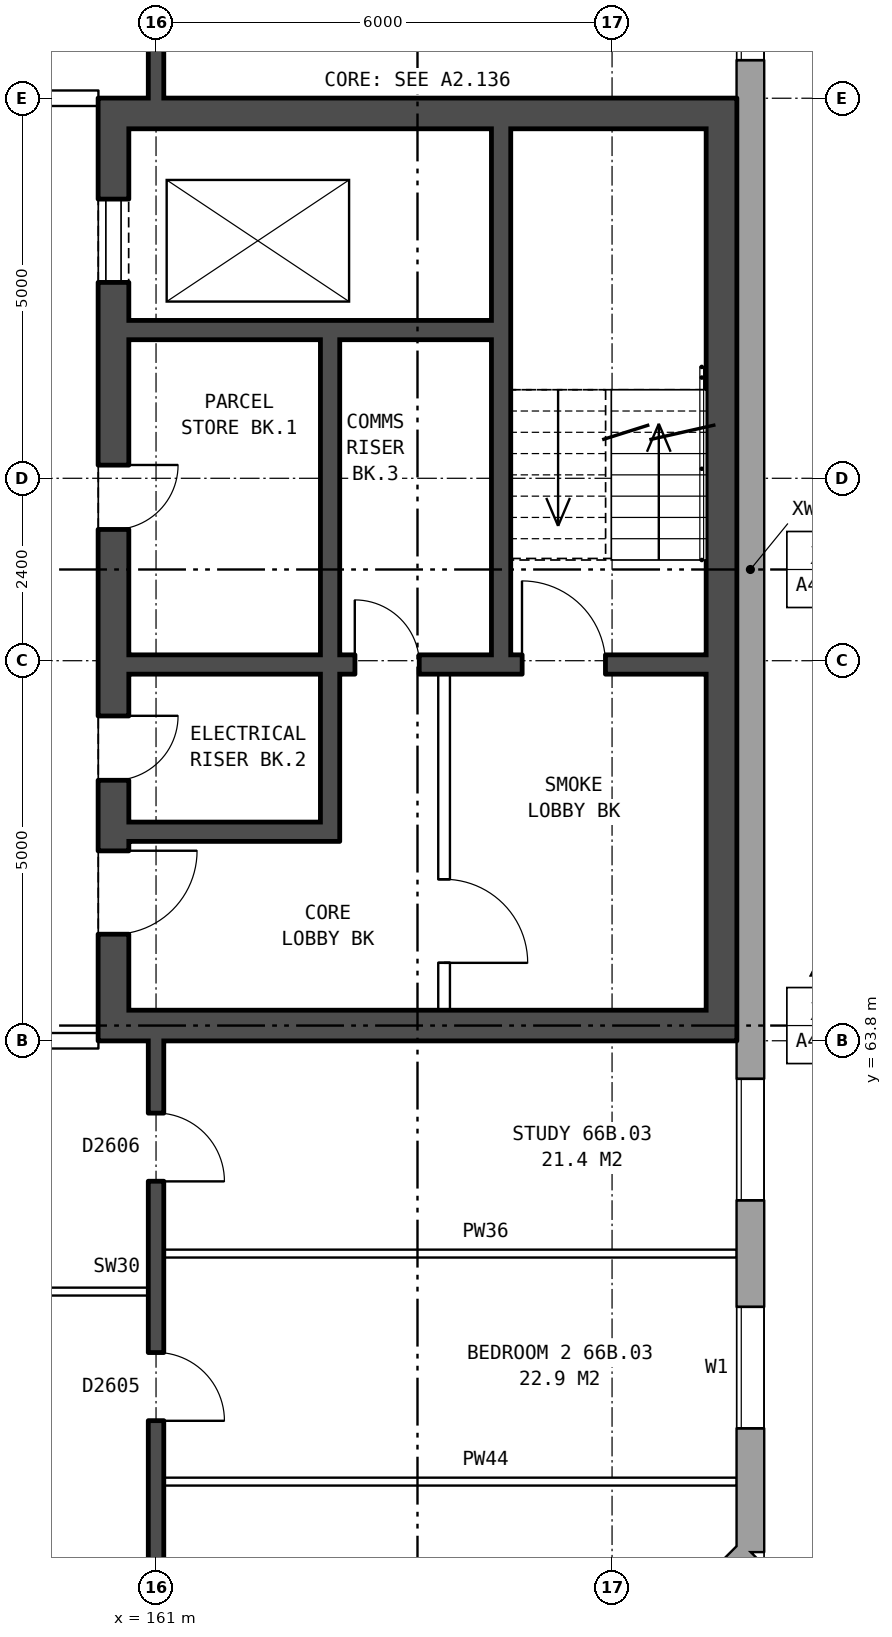
"""IFC4 building model, lengths in metres.
Left out: names, types, materials, properties, quantities, classifications, styles, units other than length and angle.
Written with IfcOpenShell. Run it as: python <this file> out.ifc"""

import sys

from ifc_helpers import new_model, si_unit, direction, frame, frame_2d, origin, place, context, subcontext, project, spatial, rectangle, extrude, element, fill, save


model = new_model("IFC4")
c1 = context("Model", 3, precision=1e-05, world=origin(), true_north=direction((0.0, 1.0)))
c2 = subcontext(c1, "Body", "Model", "MODEL_VIEW")
j1 = project(units=[si_unit("LENGTHUNIT", "METRE"), si_unit("PLANEANGLEUNIT", "RADIAN")], contexts=[c1])
p1 = place(None, origin())
s1 = spatial("IfcSite", under=j1, at=p1, CompositionType="ELEMENT")
p2 = place(p1, origin())
s2 = spatial("IfcBuilding", under=s1, at=p2, CompositionType="ELEMENT")
p3 = place(p2, frame((0.0, 0.0, 233.8)))
s3 = spatial("IfcBuildingStorey", under=s2, at=p3, CompositionType="ELEMENT", Elevation=233.8)
p4 = place(p3, frame((165.925, 54.18, 0.0), z_axis=(0.0, 0.0, 1.0), x_axis=(0.707106781187, 0.707106781187, 0.0)))
e1 = element("IfcWall", 1, at=p4, inside=s3, PredefinedType="STANDARD", context=c2, shape_type="SweptSolid", body=[
    extrude(rectangle(XDim=4.094, YDim=0.36, at=frame_2d((2.047, 0.0))), origin(), (0.0, 0.0, 1.0), 2.85),
])
p5 = place(p4, frame((1.247, 0.0, 0.8)))
e2 = element("IfcOpeningElement", 2, at=p5, cuts=e1, PredefinedType="OPENING", context=c2, shape_type="SweptSolid", body=[
    extrude(rectangle(XDim=1.6, YDim=1.8, at=frame_2d((0.8, 0.9))), frame((0.0, 0.19, 0.0), z_axis=(0.0, -1.0, 0.0), x_axis=(1.0, 0.0, 0.0)), (0.0, 0.0, 1.0), 0.38),
])
p6 = place(p3, frame((168.82, 57.075, 0.0), z_axis=(0.0, 0.0, 1.0), x_axis=(0.0, 1.0, 0.0)))
e3 = element("IfcWall", 3, at=p6, inside=s3, PredefinedType="STANDARD", context=c2, shape_type="SweptSolid", body=[
    extrude(rectangle(XDim=25.851, YDim=0.36, at=frame_2d((12.925, 0.0))), origin(), (0.0, 0.0, 1.0), 2.85),
])
p7 = place(p6, frame((1.625, 0.0, 0.8)))
e4 = element("IfcOpeningElement", 4, at=p7, cuts=e3, PredefinedType="OPENING", context=c2, shape_type="SweptSolid", body=[
    extrude(rectangle(XDim=1.6, YDim=1.8, at=frame_2d((0.8, 0.9))), frame((0.0, 0.19, 0.0), z_axis=(0.0, -1.0, 0.0), x_axis=(1.0, 0.0, 0.0)), (0.0, 0.0, 1.0), 0.38),
])
p8 = place(p6, frame((4.625, 0.0, 0.8)))
e5 = element("IfcOpeningElement", 5, at=p8, cuts=e3, PredefinedType="OPENING", context=c2, shape_type="SweptSolid", body=[
    extrude(rectangle(XDim=1.6, YDim=1.8, at=frame_2d((0.8, 0.9))), frame((0.0, 0.19, 0.0), z_axis=(0.0, -1.0, 0.0), x_axis=(1.0, 0.0, 0.0)), (0.0, 0.0, 1.0), 0.38),
])
p9 = place(p6, frame((19.625, 0.0, 0.8)))
e6 = element("IfcOpeningElement", 6, at=p9, cuts=e3, PredefinedType="OPENING", context=c2, shape_type="SweptSolid", body=[
    extrude(rectangle(XDim=1.6, YDim=1.8, at=frame_2d((0.8, 0.9))), frame((0.0, 0.19, 0.0), z_axis=(0.0, -1.0, 0.0), x_axis=(1.0, 0.0, 0.0)), (0.0, 0.0, 1.0), 0.38),
])
p10 = place(p6, frame((22.625, 0.0, 0.8)))
e7 = element("IfcOpeningElement", 7, at=p10, cuts=e3, PredefinedType="OPENING", context=c2, shape_type="SweptSolid", body=[
    extrude(rectangle(XDim=1.6, YDim=1.8, at=frame_2d((0.8, 0.9))), frame((0.0, 0.19, 0.0), z_axis=(0.0, -1.0, 0.0), x_axis=(1.0, 0.0, 0.0)), (0.0, 0.0, 1.0), 0.38),
])
p11 = place(p3, frame((160.44, 76.2, 0.0), z_axis=(0.0, 0.0, 1.0), x_axis=(0.0, -1.0, 0.0)))
e8 = element("IfcWall", 8, at=p11, inside=s3, PredefinedType="SHEAR", context=c2, shape_type="SweptSolid", body=[
    extrude(rectangle(XDim=12.4, YDim=0.4, at=frame_2d((6.2, 0.0))), origin(), (0.0, 0.0, 1.0), 2.85),
])
p12 = place(p11, frame((1.325, 0.0, 0.0)))
e9 = element("IfcOpeningElement", 9, at=p12, cuts=e8, PredefinedType="OPENING", context=c2, shape_type="SweptSolid", body=[
    extrude(rectangle(XDim=1.1, YDim=2.1, at=frame_2d((0.55, 1.05))), frame((0.0, 0.21, 0.0), z_axis=(0.0, -1.0, 0.0), x_axis=(1.0, 0.0, 0.0)), (0.0, 0.0, 1.0), 0.42),
])
p13 = place(p11, frame((4.825, 0.0, 0.0)))
e10 = element("IfcOpeningElement", 10, at=p13, cuts=e8, PredefinedType="OPENING", context=c2, shape_type="SweptSolid", body=[
    extrude(rectangle(XDim=0.85, YDim=2.1, at=frame_2d((0.425, 1.05))), frame((0.0, 0.21, 0.0), z_axis=(0.0, -1.0, 0.0), x_axis=(1.0, 0.0, 0.0)), (0.0, 0.0, 1.0), 0.42),
])
p14 = place(p11, frame((9.9, 0.0, 0.0)))
e11 = element("IfcOpeningElement", 11, at=p14, cuts=e8, PredefinedType="OPENING", context=c2, shape_type="SweptSolid", body=[
    extrude(rectangle(XDim=1.1, YDim=2.1, at=frame_2d((0.55, 1.05))), frame((0.0, 0.21, 0.0), z_axis=(0.0, -1.0, 0.0), x_axis=(1.0, 0.0, 0.0)), (0.0, 0.0, 1.0), 0.42),
])
p15 = place(p11, frame((8.125, 0.0, 0.0)))
e12 = element("IfcOpeningElement", 12, at=p15, cuts=e8, PredefinedType="OPENING", context=c2, shape_type="SweptSolid", body=[
    extrude(rectangle(XDim=0.85, YDim=2.1, at=frame_2d((0.425, 1.05))), frame((0.0, 0.21, 0.0), z_axis=(0.0, -1.0, 0.0), x_axis=(1.0, 0.0, 0.0)), (0.0, 0.0, 1.0), 0.42),
])
p16 = place(p3, frame((168.44, 76.2, 0.0), z_axis=(0.0, 0.0, 1.0), x_axis=(0.0, -1.0, 0.0)))
e13 = element("IfcWall", 13, at=p16, inside=s3, PredefinedType="SHEAR", context=c2, shape_type="SweptSolid", body=[
    extrude(rectangle(XDim=12.4, YDim=0.4, at=frame_2d((6.2, 0.0))), origin(), (0.0, 0.0, 1.0), 2.85),
])
for number, where, z_axis, x_axis in (
    (14, (160.64, 76.0, 0.0), (0.0, 0.0, 1.0), (1.0, 0.0, 0.0)),
    (15, (160.64, 64.0, 0.0), (0.0, 0.0, 1.0), (1.0, 0.0, 0.0)),
):
    element("IfcWall", number, at=place(p3, frame(where, z_axis=z_axis, x_axis=x_axis)), inside=s3, PredefinedType="SHEAR", context=c2, shape_type="SweptSolid", body=[
        extrude(rectangle(XDim=7.6, YDim=0.4, at=frame_2d((3.8, 0.0))), origin(), (0.0, 0.0, 1.0), 2.85),
    ])
p17 = place(p3, frame((160.64, 73.15, 0.0), z_axis=(0.0, 0.0, 1.0), x_axis=(1.0, 0.0, 0.0)))
e16 = element("IfcWall", 16, at=p17, inside=s3, PredefinedType="SHEAR", context=c2, shape_type="SweptSolid", body=[
    extrude(rectangle(XDim=4.775, YDim=0.25, at=frame_2d((2.388, 0.0))), origin(), (0.0, 0.0, 1.0), 2.85),
])
p18 = place(p3, frame((160.64, 68.75, 0.0), z_axis=(0.0, 0.0, 1.0), x_axis=(1.0, 0.0, 0.0)))
e17 = element("IfcWall", 17, at=p18, inside=s3, PredefinedType="SHEAR", context=c2, shape_type="SweptSolid", body=[
    extrude(rectangle(XDim=7.6, YDim=0.25, at=frame_2d((3.8, 0.0))), origin(), (0.0, 0.0, 1.0), 2.85),
])
p19 = place(p18, frame((5.175, 0.0, 0.0)))
e18 = element("IfcOpeningElement", 18, at=p19, cuts=e17, PredefinedType="OPENING", context=c2, shape_type="SweptSolid", body=[
    extrude(rectangle(XDim=1.1, YDim=2.1, at=frame_2d((0.55, 1.05))), frame((0.0, 0.135, 0.0), z_axis=(0.0, -1.0, 0.0), x_axis=(1.0, 0.0, 0.0)), (0.0, 0.0, 1.0), 0.27),
])
p20 = place(p18, frame((2.975, 0.0, 0.0)))
e19 = element("IfcOpeningElement", 19, at=p20, cuts=e17, PredefinedType="OPENING", context=c2, shape_type="SweptSolid", body=[
    extrude(rectangle(XDim=0.85, YDim=2.1, at=frame_2d((0.425, 1.05))), frame((0.0, 0.135, 0.0), z_axis=(0.0, -1.0, 0.0), x_axis=(1.0, 0.0, 0.0)), (0.0, 0.0, 1.0), 0.27),
])
p21 = place(p3, frame((160.64, 66.55, 0.0), z_axis=(0.0, 0.0, 1.0), x_axis=(1.0, 0.0, 0.0)))
e20 = element("IfcWall", 20, at=p21, inside=s3, PredefinedType="SHEAR", context=c2, shape_type="SweptSolid", body=[
    extrude(rectangle(XDim=2.525, YDim=0.25, at=frame_2d((1.263, 0.0))), origin(), (0.0, 0.0, 1.0), 2.85),
])
p22 = place(p3, frame((163.29, 73.025, 0.0), z_axis=(0.0, 0.0, 1.0), x_axis=(0.0, -1.0, 0.0)))
e21 = element("IfcWall", 21, at=p22, inside=s3, PredefinedType="SHEAR", context=c2, shape_type="SweptSolid", body=[
    extrude(rectangle(XDim=4.15, YDim=0.25, at=frame_2d((2.075, 0.0))), origin(), (0.0, 0.0, 1.0), 2.85),
])
p23 = place(p3, frame((163.29, 68.625, 0.0), z_axis=(0.0, 0.0, 1.0), x_axis=(0.0, -1.0, 0.0)))
e22 = element("IfcWall", 22, at=p23, inside=s3, PredefinedType="SHEAR", context=c2, shape_type="SweptSolid", body=[
    extrude(rectangle(XDim=2.2, YDim=0.25, at=frame_2d((1.1, 0.0))), origin(), (0.0, 0.0, 1.0), 2.85),
])
p24 = place(p3, frame((164.79, 68.625, 0.0), z_axis=(0.0, 0.0, 1.0), x_axis=(0.0, -1.0, 0.0)))
e23 = element("IfcWall", 23, at=p24, inside=s3, PredefinedType="PARTITIONING", context=c2, shape_type="SweptSolid", body=[
    extrude(rectangle(XDim=4.425, YDim=0.15, at=frame_2d((2.212, 0.0))), origin(), (0.0, 0.0, 1.0), 2.85),
])
p25 = place(p24, frame((2.7, 0.0, 0.0)))
e24 = element("IfcOpeningElement", 24, at=p25, cuts=e23, PredefinedType="OPENING", context=c2, shape_type="SweptSolid", body=[
    extrude(rectangle(XDim=1.1, YDim=2.1, at=frame_2d((0.55, 1.05))), frame((0.0, 0.085, 0.0), z_axis=(0.0, -1.0, 0.0), x_axis=(1.0, 0.0, 0.0)), (0.0, 0.0, 1.0), 0.17),
])
p26 = place(p3, frame((165.54, 75.8, 0.0), z_axis=(0.0, 0.0, 1.0), x_axis=(0.0, -1.0, 0.0)))
e25 = element("IfcWall", 25, at=p26, inside=s3, PredefinedType="SHEAR", context=c2, shape_type="SweptSolid", body=[
    extrude(rectangle(XDim=6.925, YDim=0.25, at=frame_2d((3.462, 0.0))), origin(), (0.0, 0.0, 1.0), 2.85),
])
p27 = place(p3, frame((161.1, 58.0, 0.0), z_axis=(0.0, 0.0, 1.0), x_axis=(1.0, 0.0, 0.0)))
e26 = element("IfcWall", 26, at=p27, inside=s3, PredefinedType="PARTITIONING", context=c2, shape_type="SweptSolid", body=[
    extrude(rectangle(XDim=7.54, YDim=0.1, at=frame_2d((3.77, 0.0))), origin(), (0.0, 0.0, 1.0), 2.85),
])
p28 = place(p3, frame((155.1, 60.5, 0.0), z_axis=(0.0, 0.0, 1.0), x_axis=(1.0, 0.0, 0.0)))
e27 = element("IfcWall", 27, at=p28, inside=s3, PredefinedType="PARTITIONING", context=c2, shape_type="SweptSolid", body=[
    extrude(rectangle(XDim=5.8, YDim=0.1, at=frame_2d((2.9, 0.0))), origin(), (0.0, 0.0, 1.0), 2.85),
])
p29 = place(p28, frame((3.6, 0.0, 0.0)))
e28 = element("IfcOpeningElement", 28, at=p29, cuts=e27, PredefinedType="OPENING", context=c2, shape_type="SweptSolid", body=[
    extrude(rectangle(XDim=0.9, YDim=2.1, at=frame_2d((0.45, 1.05))), frame((0.0, 0.06, 0.0), z_axis=(0.0, -1.0, 0.0), x_axis=(1.0, 0.0, 0.0)), (0.0, 0.0, 1.0), 0.12),
])
p30 = place(p28, frame((0.7, 0.0, 0.0)))
e29 = element("IfcOpeningElement", 29, at=p30, cuts=e27, PredefinedType="OPENING", context=c2, shape_type="SweptSolid", body=[
    extrude(rectangle(XDim=0.9, YDim=2.1, at=frame_2d((0.45, 1.05))), frame((0.0, 0.06, 0.0), z_axis=(0.0, -1.0, 0.0), x_axis=(1.0, 0.0, 0.0)), (0.0, 0.0, 1.0), 0.12),
])
p31 = place(p3, frame((161.1, 61.0, 0.0), z_axis=(0.0, 0.0, 1.0), x_axis=(1.0, 0.0, 0.0)))
e30 = element("IfcWall", 30, at=p31, inside=s3, PredefinedType="PARTITIONING", context=c2, shape_type="SweptSolid", body=[
    extrude(rectangle(XDim=7.54, YDim=0.1, at=frame_2d((3.77, 0.0))), origin(), (0.0, 0.0, 1.0), 2.85),
])
p32 = place(p3, frame((157.24, 63.8, 0.0), z_axis=(0.0, 0.0, 1.0), x_axis=(1.0, 0.0, 0.0)))
e31 = element("IfcWall", 31, at=p32, inside=s3, PredefinedType="PARTITIONING", context=c2, shape_type="SweptSolid", body=[
    extrude(rectangle(XDim=3.0, YDim=0.2, at=frame_2d((1.5, 0.0))), origin(), (0.0, 0.0, 1.0), 2.85),
])
p33 = place(p32, frame((1.0, 0.0, 0.0)))
e32 = element("IfcOpeningElement", 32, at=p33, cuts=e31, PredefinedType="OPENING", context=c2, shape_type="SweptSolid", body=[
    extrude(rectangle(XDim=1.0, YDim=2.1, at=frame_2d((0.5, 1.05))), frame((0.0, 0.11, 0.0), z_axis=(0.0, -1.0, 0.0), x_axis=(1.0, 0.0, 0.0)), (0.0, 0.0, 1.0), 0.22),
])
p34 = place(p3, frame((157.24, 76.2, 0.0), z_axis=(0.0, 0.0, 1.0), x_axis=(1.0, 0.0, 0.0)))
e33 = element("IfcWall", 33, at=p34, inside=s3, PredefinedType="PARTITIONING", context=c2, shape_type="SweptSolid", body=[
    extrude(rectangle(XDim=3.0, YDim=0.2, at=frame_2d((1.5, 0.0))), origin(), (0.0, 0.0, 1.0), 2.85),
])
p35 = place(p34, frame((1.0, 0.0, 0.0)))
e34 = element("IfcOpeningElement", 34, at=p35, cuts=e33, PredefinedType="OPENING", context=c2, shape_type="SweptSolid", body=[
    extrude(rectangle(XDim=1.0, YDim=2.1, at=frame_2d((0.5, 1.05))), frame((0.0, 0.11, 0.0), z_axis=(0.0, -1.0, 0.0), x_axis=(1.0, 0.0, 0.0)), (0.0, 0.0, 1.0), 0.22),
])
p36 = place(p3, frame((161.0, 54.36, 0.0), z_axis=(0.0, 0.0, 1.0), x_axis=(0.0, 1.0, 0.0)))
e35 = element("IfcWall", 35, at=p36, inside=s3, PredefinedType="SOLIDWALL", context=c2, shape_type="SweptSolid", body=[
    extrude(rectangle(XDim=9.44, YDim=0.2, at=frame_2d((4.72, 0.0))), origin(), (0.0, 0.0, 1.0), 2.85),
])
p37 = place(p36, frame((1.37, 0.0, 0.0)))
e36 = element("IfcOpeningElement", 36, at=p37, cuts=e35, PredefinedType="OPENING", context=c2, shape_type="SweptSolid", body=[
    extrude(rectangle(XDim=0.9, YDim=2.1, at=frame_2d((0.45, 1.05))), frame((0.0, 0.11, 0.0), z_axis=(0.0, -1.0, 0.0), x_axis=(1.0, 0.0, 0.0)), (0.0, 0.0, 1.0), 0.22),
])
p38 = place(p36, frame((4.44, 0.0, 0.0)))
e37 = element("IfcOpeningElement", 37, at=p38, cuts=e35, PredefinedType="OPENING", context=c2, shape_type="SweptSolid", body=[
    extrude(rectangle(XDim=0.9, YDim=2.1, at=frame_2d((0.45, 1.05))), frame((0.0, 0.11, 0.0), z_axis=(0.0, -1.0, 0.0), x_axis=(1.0, 0.0, 0.0)), (0.0, 0.0, 1.0), 0.22),
])
p39 = place(p36, frame((7.59, 0.0, 0.0)))
e38 = element("IfcOpeningElement", 38, at=p39, cuts=e35, PredefinedType="OPENING", context=c2, shape_type="SweptSolid", body=[
    extrude(rectangle(XDim=0.9, YDim=2.1, at=frame_2d((0.45, 1.05))), frame((0.0, 0.11, 0.0), z_axis=(0.0, -1.0, 0.0), x_axis=(1.0, 0.0, 0.0)), (0.0, 0.0, 1.0), 0.22),
])
p40 = place(p3, frame((161.0, 76.2, 0.0), z_axis=(0.0, 0.0, 1.0), x_axis=(0.0, 1.0, 0.0)))
e39 = element("IfcWall", 39, at=p40, inside=s3, PredefinedType="SOLIDWALL", context=c2, shape_type="SweptSolid", body=[
    extrude(rectangle(XDim=9.44, YDim=0.2, at=frame_2d((4.72, 0.0))), origin(), (0.0, 0.0, 1.0), 2.85),
])
p41 = place(p40, frame((1.2, 0.0, 0.0)))
e40 = element("IfcOpeningElement", 40, at=p41, cuts=e39, PredefinedType="OPENING", context=c2, shape_type="SweptSolid", body=[
    extrude(rectangle(XDim=0.9, YDim=2.1, at=frame_2d((0.45, 1.05))), frame((0.0, 0.11, 0.0), z_axis=(0.0, -1.0, 0.0), x_axis=(1.0, 0.0, 0.0)), (0.0, 0.0, 1.0), 0.22),
])
p42 = place(p7, origin())
e41 = element("IfcWindow", 41, at=p42, inside=s3, PartitioningType="SINGLE_PANEL", PredefinedType="WINDOW", context=c2, shape_type="SweptSolid", body=[
    extrude(rectangle(XDim=1.6, YDim=1.8, at=frame_2d((0.8, 0.9))), frame((0.0, 0.15, 0.0), z_axis=(0.0, -1.0, 0.0), x_axis=(1.0, 0.0, 0.0)), (0.0, 0.0, 1.0), 0.06),
])
fill(e4, e41)
p43 = place(p8, origin())
e42 = element("IfcWindow", 42, at=p43, inside=s3, PartitioningType="SINGLE_PANEL", PredefinedType="WINDOW", context=c2, shape_type="SweptSolid", body=[
    extrude(rectangle(XDim=1.6, YDim=1.8, at=frame_2d((0.8, 0.9))), frame((0.0, 0.15, 0.0), z_axis=(0.0, -1.0, 0.0), x_axis=(1.0, 0.0, 0.0)), (0.0, 0.0, 1.0), 0.06),
])
fill(e5, e42)
p44 = place(p9, origin())
e43 = element("IfcWindow", 43, at=p44, inside=s3, PartitioningType="SINGLE_PANEL", PredefinedType="WINDOW", context=c2, shape_type="SweptSolid", body=[
    extrude(rectangle(XDim=1.6, YDim=1.8, at=frame_2d((0.8, 0.9))), frame((0.0, 0.15, 0.0), z_axis=(0.0, -1.0, 0.0), x_axis=(1.0, 0.0, 0.0)), (0.0, 0.0, 1.0), 0.06),
])
fill(e6, e43)
p45 = place(p12, origin())
e44 = element("IfcDoor", 44, at=p45, inside=s3, OperationType="DOUBLE_DOOR_SLIDING", PredefinedType="DOOR", context=c2, shape_type="SweptSolid", body=[
    extrude(rectangle(XDim=1.1, YDim=2.1, at=frame_2d((0.55, 1.05))), frame((0.0, 0.185, 0.0), z_axis=(0.0, -1.0, 0.0), x_axis=(1.0, 0.0, 0.0)), (0.0, 0.0, 1.0), 0.05),
])
fill(e9, e44)
p46 = place(p13, origin())
e45 = element("IfcDoor", 45, at=p46, inside=s3, OperationType="SINGLE_SWING_LEFT", PredefinedType="DOOR", context=c2, shape_type="SweptSolid", body=[
    extrude(rectangle(XDim=0.85, YDim=2.1, at=frame_2d((0.425, 1.05))), frame((0.0, 0.185, 0.0), z_axis=(0.0, -1.0, 0.0), x_axis=(1.0, 0.0, 0.0)), (0.0, 0.0, 1.0), 0.05),
])
fill(e10, e45)
p47 = place(p14, origin())
e46 = element("IfcDoor", 46, at=p47, inside=s3, OperationType="SINGLE_SWING_LEFT", PredefinedType="DOOR", context=c2, shape_type="SweptSolid", body=[
    extrude(rectangle(XDim=1.1, YDim=2.1, at=frame_2d((0.55, 1.05))), frame((0.0, 0.185, 0.0), z_axis=(0.0, -1.0, 0.0), x_axis=(1.0, 0.0, 0.0)), (0.0, 0.0, 1.0), 0.05),
])
fill(e11, e46)
p48 = place(p25, origin())
e47 = element("IfcDoor", 47, at=p48, inside=s3, OperationType="SINGLE_SWING_RIGHT", PredefinedType="DOOR", context=c2, shape_type="SweptSolid", body=[
    extrude(rectangle(XDim=1.1, YDim=2.1, at=frame_2d((0.55, 1.05))), frame((0.0, 0.025, 0.0), z_axis=(0.0, -1.0, 0.0), x_axis=(1.0, 0.0, 0.0)), (0.0, 0.0, 1.0), 0.05),
])
fill(e24, e47)
p49 = place(p19, origin())
e48 = element("IfcDoor", 48, at=p49, inside=s3, OperationType="SINGLE_SWING_LEFT", PredefinedType="DOOR", context=c2, shape_type="SweptSolid", body=[
    extrude(rectangle(XDim=1.1, YDim=2.1, at=frame_2d((0.55, 1.05))), frame((0.0, 0.025, 0.0), z_axis=(0.0, -1.0, 0.0), x_axis=(1.0, 0.0, 0.0)), (0.0, 0.0, 1.0), 0.05),
])
fill(e18, e48)
p50 = place(p15, origin())
e49 = element("IfcDoor", 49, at=p50, inside=s3, OperationType="SINGLE_SWING_LEFT", PredefinedType="DOOR", context=c2, shape_type="SweptSolid", body=[
    extrude(rectangle(XDim=0.85, YDim=2.1, at=frame_2d((0.425, 1.05))), frame((0.0, 0.185, 0.0), z_axis=(0.0, -1.0, 0.0), x_axis=(1.0, 0.0, 0.0)), (0.0, 0.0, 1.0), 0.05),
])
fill(e12, e49)
p51 = place(p20, origin())
e50 = element("IfcDoor", 50, at=p51, inside=s3, OperationType="SINGLE_SWING_LEFT", PredefinedType="DOOR", context=c2, shape_type="SweptSolid", body=[
    extrude(rectangle(XDim=0.85, YDim=2.1, at=frame_2d((0.425, 1.05))), frame((0.0, 0.025, 0.0), z_axis=(0.0, -1.0, 0.0), x_axis=(1.0, 0.0, 0.0)), (0.0, 0.0, 1.0), 0.05),
])
fill(e19, e50)
p52 = place(p38, frame((0.9, 0.0, 0.0), z_axis=(0.0, 0.0, 1.0), x_axis=(-1.0, 0.0, 0.0)))
e51 = element("IfcDoor", 51, at=p52, inside=s3, OperationType="SINGLE_SWING_RIGHT", PredefinedType="DOOR", context=c2, shape_type="SweptSolid", body=[
    extrude(rectangle(XDim=0.9, YDim=2.1, at=frame_2d((0.45, 1.05))), frame((0.0, 0.025, 0.0), z_axis=(0.0, -1.0, 0.0), x_axis=(1.0, 0.0, 0.0)), (0.0, 0.0, 1.0), 0.05),
])
fill(e37, e51)
p53 = place(p39, frame((0.9, 0.0, 0.0), z_axis=(0.0, 0.0, 1.0), x_axis=(-1.0, 0.0, 0.0)))
e52 = element("IfcDoor", 52, at=p53, inside=s3, OperationType="SINGLE_SWING_RIGHT", PredefinedType="DOOR", context=c2, shape_type="SweptSolid", body=[
    extrude(rectangle(XDim=0.9, YDim=2.1, at=frame_2d((0.45, 1.05))), frame((0.0, 0.025, 0.0), z_axis=(0.0, -1.0, 0.0), x_axis=(1.0, 0.0, 0.0)), (0.0, 0.0, 1.0), 0.05),
])
fill(e38, e52)
save(model, sys.argv[1])
